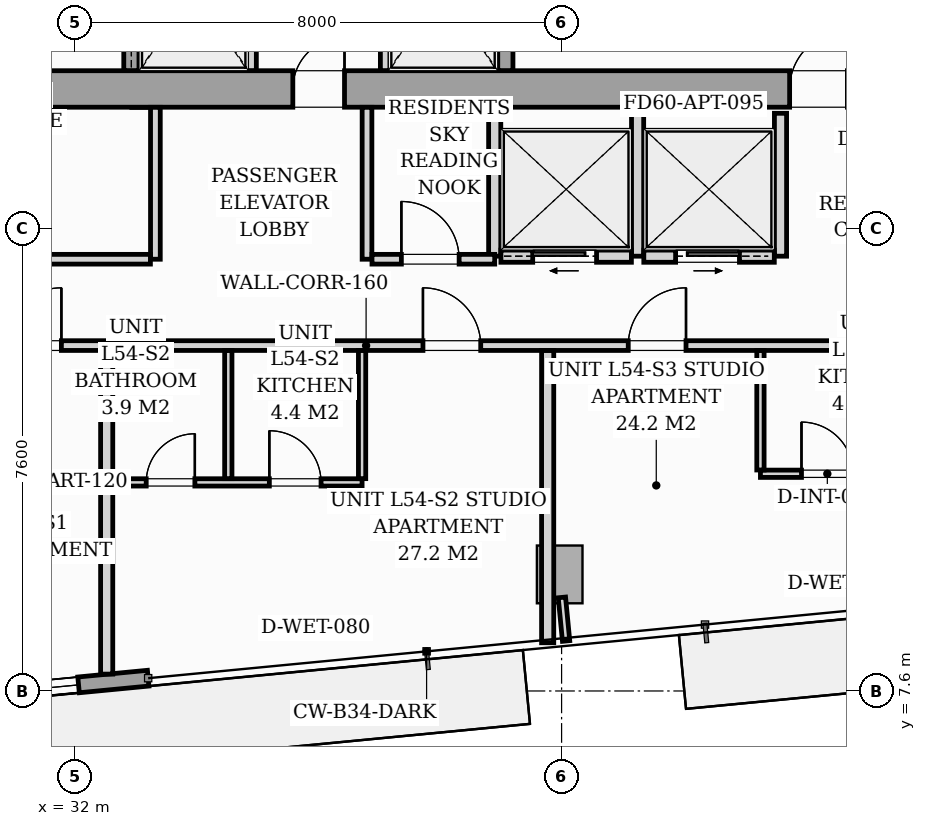
"""IFC4 building model, lengths in metres.
Left out: names, types, materials, properties, quantities, classifications, styles, units other than length and angle.
Written with IfcOpenShell. Run it as: python <this file> out.ifc"""

import sys

from ifc_helpers import new_model, si_unit, direction, frame, frame_2d, origin, origin_2d, place, context, subcontext, project, spatial, rectangle, i_section, extrude, source, transform, mapped, element, fill, save


model = new_model("IFC4")
c1 = context("Model", 3, precision=1e-05, world=origin(), true_north=direction((0.0, 1.0)))
c2 = subcontext(c1, "Body", "Model", "MODEL_VIEW")
j1 = project(units=[si_unit("LENGTHUNIT", "METRE"), si_unit("PLANEANGLEUNIT", "RADIAN")], contexts=[c1])
p1 = place(None, origin())
s1 = spatial("IfcSite", under=j1, at=p1, CompositionType="ELEMENT")
p2 = place(p1, origin())
s2 = spatial("IfcBuilding", under=s1, at=p2, CompositionType="ELEMENT")
p3 = place(p2, frame((0.0, 0.0, 189.0)))
s3 = spatial("IfcBuildingStorey", under=s2, at=p3, CompositionType="ELEMENT", Elevation=189.0)
m1 = source(origin(), c2, "Body", "SweptSolid", [
    extrude(i_section(OverallWidth=0.416, OverallDepth=0.446, WebThickness=0.039, FlangeThickness=0.063, FilletRadius=0.018, at=origin_2d()), origin(), (0.0, 0.0, 1.0), 3.196),
])
for number, where, z_axis, x_axis in (
    (1, (33.12, 17.4, 0.002), (0.0, 0.0, 1.0), (1.0, 0.0, 0.0)),
    (2, (38.88, 17.4, 0.002), (0.0, 0.0, 1.0), (1.0, 0.0, 0.0)),
):
    element("IfcColumn", number, at=place(p3, frame(where, z_axis=z_axis, x_axis=x_axis)), inside=s3, PredefinedType="PILASTER", context=c2, shape_type="MappedRepresentation", body=[
        mapped(m1, transform((0.0, 0.0, 0.0), scale=1.0)),
    ])
m2 = source(origin(), c2, "Body", "SweptSolid", [
    extrude(rectangle(XDim=0.75, YDim=0.95, at=origin_2d()), origin(), (0.0, 0.0, 1.0), 3.196),
])
p4 = place(p3, frame((39.969, 9.517, 0.002), z_axis=(0.0, 0.0, 1.0), x_axis=(0.995396198367, 0.09584575252, 0.0)))
e3 = element("IfcColumn", 3, at=p4, inside=s3, PredefinedType="COLUMN", context=c2, shape_type="MappedRepresentation", body=[
    mapped(m2, transform((0.0, 0.0, 0.0), scale=1.0)),
])
p5 = place(p3, frame((33.201, 7.81, 0.0), z_axis=(0.0, 0.0, 1.0), x_axis=(-0.995397074604, -0.095836652014, 0.0)))
e4 = element("IfcWall", 4, at=p5, inside=s3, PredefinedType="STANDARD", context=c2, shape_type="SweptSolid", body=[
    extrude(rectangle(XDim=16.1, YDim=0.26, at=frame_2d((8.05, 0.0))), origin(), (0.0, 0.0, 1.0), 2.94),
])
p6 = place(p5, frame((7.49, 0.0, 0.0)))
e5 = element("IfcOpeningElement", 5, at=p6, cuts=e4, PredefinedType="OPENING", context=c2, shape_type="SweptSolid", body=[
    extrude(rectangle(XDim=1.8, YDim=2.06, at=frame_2d((0.9, 1.03))), frame((0.0, 0.14, 0.0), z_axis=(0.0, -1.0, 0.0), x_axis=(1.0, 0.0, 0.0)), (0.0, 0.0, 1.0), 0.28),
])
p7 = place(p5, frame((1.15, 0.0, 0.65)))
e6 = element("IfcOpeningElement", 6, at=p7, cuts=e4, PredefinedType="OPENING", context=c2, shape_type="SweptSolid", body=[
    extrude(rectangle(XDim=1.6, YDim=1.5, at=frame_2d((0.8, 0.75))), frame((0.0, 0.14, 0.0), z_axis=(0.0, -1.0, 0.0), x_axis=(1.0, 0.0, 0.0)), (0.0, 0.0, 1.0), 0.28),
])
p8 = place(p3, frame((26.2, 17.5, 0.0), z_axis=(0.0, 0.0, 1.0), x_axis=(1.0, 0.0, 0.0)))
e7 = element("IfcWall", 7, at=p8, inside=s3, PredefinedType="SHEAR", context=c2, shape_type="SweptSolid", body=[
    extrude(rectangle(XDim=19.6, YDim=0.6, at=frame_2d((9.8, 0.0))), origin(), (0.0, 0.0, 1.0), 3.2),
])
p9 = place(p8, frame((0.95, 0.0, 0.0)))
e8 = element("IfcOpeningElement", 8, at=p9, cuts=e7, PredefinedType="OPENING", context=c2, shape_type="SweptSolid", body=[
    extrude(rectangle(XDim=0.95, YDim=2.06, at=frame_2d((0.475, 1.03))), frame((0.0, 0.31, 0.0), z_axis=(0.0, -1.0, 0.0), x_axis=(1.0, 0.0, 0.0)), (0.0, 0.0, 1.0), 0.62),
])
p10 = place(p8, frame((9.38, 0.0, 0.0)))
e9 = element("IfcOpeningElement", 9, at=p10, cuts=e7, PredefinedType="OPENING", context=c2, shape_type="SweptSolid", body=[
    extrude(rectangle(XDim=0.85, YDim=2.0, at=frame_2d((0.425, 1.0))), frame((0.0, 0.31, 0.0), z_axis=(0.0, -1.0, 0.0), x_axis=(1.0, 0.0, 0.0)), (0.0, 0.0, 1.0), 0.62),
])
p11 = place(p8, frame((17.55, 0.0, 0.0)))
e10 = element("IfcOpeningElement", 10, at=p11, cuts=e7, PredefinedType="OPENING", context=c2, shape_type="SweptSolid", body=[
    extrude(rectangle(XDim=0.95, YDim=2.06, at=frame_2d((0.475, 1.03))), frame((0.0, 0.31, 0.0), z_axis=(0.0, -1.0, 0.0), x_axis=(1.0, 0.0, 0.0)), (0.0, 0.0, 1.0), 0.62),
])
p12 = place(p3, frame((32.925, 17.802, 0.0), z_axis=(0.0, 0.0, 1.0), x_axis=(0.0, 1.0, 0.0)))
e11 = element("IfcWall", 11, at=p12, inside=s3, PredefinedType="SOLIDWALL", context=c2, shape_type="SweptSolid", body=[
    extrude(rectangle(XDim=2.646, YDim=0.25, at=frame_2d((1.323, 0.0))), origin(), (0.0, 0.0, 1.0), 3.2),
])
p13 = place(p12, frame((0.548, 0.0, 0.0)))
e12 = element("IfcOpeningElement", 12, at=p13, cuts=e11, PredefinedType="OPENING", context=c2, shape_type="SweptSolid", body=[
    extrude(rectangle(XDim=1.1, YDim=2.08, at=frame_2d((0.55, 1.04))), frame((0.0, 0.135, 0.0), z_axis=(0.0, -1.0, 0.0), x_axis=(1.0, 0.0, 0.0)), (0.0, 0.0, 1.0), 0.27),
])
for number, where, z_axis, x_axis in (
    (13, (34.9, 17.802, 0.0), (0.0, 0.0, 1.0), (0.0, 1.0, 0.0)),
    (14, (37.1, 17.802, 0.0), (0.0, 0.0, 1.0), (0.0, 1.0, 0.0)),
):
    element("IfcWall", number, at=place(p3, frame(where, z_axis=z_axis, x_axis=x_axis)), inside=s3, PredefinedType="PARTITIONING", context=c2, shape_type="SweptSolid", body=[
        extrude(rectangle(XDim=2.646, YDim=0.16, at=frame_2d((1.323, 0.0))), origin(), (0.0, 0.0, 1.0), 2.94),
    ])
p14 = place(p3, frame((39.075, 17.802, 0.0), z_axis=(0.0, 0.0, 1.0), x_axis=(0.0, 1.0, 0.0)))
e15 = element("IfcWall", 15, at=p14, inside=s3, PredefinedType="SOLIDWALL", context=c2, shape_type="SweptSolid", body=[
    extrude(rectangle(XDim=2.646, YDim=0.25, at=frame_2d((1.323, 0.0))), origin(), (0.0, 0.0, 1.0), 3.2),
])
p15 = place(p14, frame((0.548, 0.0, 0.0)))
e16 = element("IfcOpeningElement", 16, at=p15, cuts=e15, PredefinedType="OPENING", context=c2, shape_type="SweptSolid", body=[
    extrude(rectangle(XDim=1.1, YDim=2.08, at=frame_2d((0.55, 1.04))), frame((0.0, 0.135, 0.0), z_axis=(0.0, -1.0, 0.0), x_axis=(1.0, 0.0, 0.0)), (0.0, 0.0, 1.0), 0.27),
])
for number, where, z_axis, x_axis in (
    (17, (38.9, 14.75, 0.0), (0.0, 0.0, 1.0), (0.0, 1.0, 0.0)),
    (18, (41.25, 14.75, 0.0), (0.0, 0.0, 1.0), (0.0, 1.0, 0.0)),
    (19, (43.6, 14.75, 0.0), (0.0, 0.0, 1.0), (0.0, 1.0, 0.0)),
):
    element("IfcWall", number, at=place(p3, frame(where, z_axis=z_axis, x_axis=x_axis)), inside=s3, PredefinedType="PARTITIONING", context=c2, shape_type="SweptSolid", body=[
        extrude(rectangle(XDim=2.35, YDim=0.2, at=frame_2d((1.175, 0.0))), origin(), (0.0, 0.0, 1.0), 2.94),
    ])
p16 = place(p3, frame((39.002, 14.75, 0.0), z_axis=(0.0, 0.0, 1.0), x_axis=(1.0, 0.0, 0.0)))
e20 = element("IfcWall", 20, at=p16, inside=s3, PredefinedType="PARTITIONING", context=c2, shape_type="SweptSolid", body=[
    extrude(rectangle(XDim=2.146, YDim=0.2, at=frame_2d((1.073, 0.0))), origin(), (0.0, 0.0, 1.0), 2.94),
])
p17 = place(p16, frame((0.523, 0.0, 0.0)))
e21 = element("IfcOpeningElement", 21, at=p17, cuts=e20, PredefinedType="OPENING", context=c2, shape_type="SweptSolid", body=[
    extrude(rectangle(XDim=1.05, YDim=2.08, at=frame_2d((0.525, 1.04))), frame((0.0, 0.11, 0.0), z_axis=(0.0, -1.0, 0.0), x_axis=(1.0, 0.0, 0.0)), (0.0, 0.0, 1.0), 0.22),
])
p18 = place(p3, frame((41.352, 14.75, 0.0), z_axis=(0.0, 0.0, 1.0), x_axis=(1.0, 0.0, 0.0)))
e22 = element("IfcWall", 22, at=p18, inside=s3, PredefinedType="PARTITIONING", context=c2, shape_type="SweptSolid", body=[
    extrude(rectangle(XDim=2.146, YDim=0.2, at=frame_2d((1.073, 0.0))), origin(), (0.0, 0.0, 1.0), 2.94),
])
p19 = place(p18, frame((0.523, 0.0, 0.0)))
e23 = element("IfcOpeningElement", 23, at=p19, cuts=e22, PredefinedType="OPENING", context=c2, shape_type="SweptSolid", body=[
    extrude(rectangle(XDim=1.05, YDim=2.08, at=frame_2d((0.525, 1.04))), frame((0.0, 0.11, 0.0), z_axis=(0.0, -1.0, 0.0), x_axis=(1.0, 0.0, 0.0)), (0.0, 0.0, 1.0), 0.22),
])
p20 = place(p3, frame((26.12, 13.28, 0.0), z_axis=(0.0, 0.0, 1.0), x_axis=(1.0, 0.0, 0.0)))
e24 = element("IfcWall", 24, at=p20, inside=s3, PredefinedType="PARTITIONING", context=c2, shape_type="SweptSolid", body=[
    extrude(rectangle(XDim=21.33, YDim=0.16, at=frame_2d((10.665, 0.0))), origin(), (0.0, 0.0, 1.0), 2.94),
])
p21 = place(p20, frame((4.704, 0.0, 0.0)))
e25 = element("IfcOpeningElement", 25, at=p21, cuts=e24, PredefinedType="OPENING", context=c2, shape_type="SweptSolid", body=[
    extrude(rectangle(XDim=0.95, YDim=2.06, at=frame_2d((0.475, 1.03))), frame((0.0, 0.09, 0.0), z_axis=(0.0, -1.0, 0.0), x_axis=(1.0, 0.0, 0.0)), (0.0, 0.0, 1.0), 0.18),
])
p22 = place(p20, frame((11.6, 0.0, 0.0)))
e26 = element("IfcOpeningElement", 26, at=p22, cuts=e24, PredefinedType="OPENING", context=c2, shape_type="SweptSolid", body=[
    extrude(rectangle(XDim=0.95, YDim=2.06, at=frame_2d((0.475, 1.03))), frame((0.0, 0.09, 0.0), z_axis=(0.0, -1.0, 0.0), x_axis=(1.0, 0.0, 0.0)), (0.0, 0.0, 1.0), 0.18),
])
p23 = place(p20, frame((14.976, 0.0, 0.0)))
e27 = element("IfcOpeningElement", 27, at=p23, cuts=e24, PredefinedType="OPENING", context=c2, shape_type="SweptSolid", body=[
    extrude(rectangle(XDim=0.95, YDim=2.06, at=frame_2d((0.475, 1.03))), frame((0.0, 0.09, 0.0), z_axis=(0.0, -1.0, 0.0), x_axis=(1.0, 0.0, 0.0)), (0.0, 0.0, 1.0), 0.18),
])
p24 = place(p3, frame((32.519, 7.877, 0.0), z_axis=(0.0, 0.0, 1.0), x_axis=(0.0, 1.0, 0.0)))
e28 = element("IfcWall", 28, at=p24, inside=s3, PredefinedType="PARTITIONING", context=c2, shape_type="SweptSolid", body=[
    extrude(rectangle(XDim=5.321, YDim=0.2, at=frame_2d((2.66, 0.0))), origin(), (0.0, 0.0, 1.0), 2.94),
])
p25 = place(p3, frame((32.621, 11.03, 0.0), z_axis=(0.0, 0.0, 1.0), x_axis=(1.0, 0.0, 0.0)))
e29 = element("IfcWall", 29, at=p25, inside=s3, PredefinedType="PARTITIONING", context=c2, shape_type="SweptSolid", body=[
    extrude(rectangle(XDim=4.098, YDim=0.12, at=frame_2d((2.049, 0.0))), origin(), (0.0, 0.0, 1.0), 2.94),
])
p26 = place(p25, frame((0.548, 0.0, 0.0)))
e30 = element("IfcOpeningElement", 30, at=p26, cuts=e29, PredefinedType="OPENING", context=c2, shape_type="SweptSolid", body=[
    extrude(rectangle(XDim=0.8, YDim=2.02, at=frame_2d((0.4, 1.01))), frame((0.0, 0.07, 0.0), z_axis=(0.0, -1.0, 0.0), x_axis=(1.0, 0.0, 0.0)), (0.0, 0.0, 1.0), 0.14),
])
p27 = place(p25, frame((2.573, 0.0, 0.0)))
e31 = element("IfcOpeningElement", 31, at=p27, cuts=e29, PredefinedType="OPENING", context=c2, shape_type="SweptSolid", body=[
    extrude(rectangle(XDim=0.85, YDim=2.05, at=frame_2d((0.425, 1.025))), frame((0.0, 0.07, 0.0), z_axis=(0.0, -1.0, 0.0), x_axis=(1.0, 0.0, 0.0)), (0.0, 0.0, 1.0), 0.14),
])
for number, where, z_axis, x_axis in (
    (32, (36.719, 11.092, 0.0), (0.0, 0.0, 1.0), (0.0, 1.0, 0.0)),
    (33, (34.519, 11.092, 0.0), (0.0, 0.0, 1.0), (0.0, 1.0, 0.0)),
):
    element("IfcWall", number, at=place(p3, frame(where, z_axis=z_axis, x_axis=x_axis)), inside=s3, PredefinedType="PARTITIONING", context=c2, shape_type="SweptSolid", body=[
        extrude(rectangle(XDim=2.106, YDim=0.12, at=frame_2d((1.053, 0.0))), origin(), (0.0, 0.0, 1.0), 2.94),
    ])
p28 = place(p3, frame((39.771, 8.393, 0.0), z_axis=(0.0, 0.0, 1.0), x_axis=(0.0, 1.0, 0.0)))
e34 = element("IfcWall", 34, at=p28, inside=s3, PredefinedType="PARTITIONING", context=c2, shape_type="SweptSolid", body=[
    extrude(rectangle(XDim=4.805, YDim=0.2, at=frame_2d((2.403, 0.0))), origin(), (0.0, 0.0, 1.0), 2.94),
])
p29 = place(p3, frame((43.27, 11.172, 0.0), z_axis=(0.0, 0.0, 1.0), x_axis=(1.0, 0.0, 0.0)))
e35 = element("IfcWall", 35, at=p29, inside=s3, PredefinedType="PARTITIONING", context=c2, shape_type="SweptSolid", body=[
    extrude(rectangle(XDim=4.098, YDim=0.12, at=frame_2d((2.049, 0.0))), origin(), (0.0, 0.0, 1.0), 2.94),
])
p30 = place(p29, frame((0.675, 0.0, 0.0)))
e36 = element("IfcOpeningElement", 36, at=p30, cuts=e35, PredefinedType="OPENING", context=c2, shape_type="SweptSolid", body=[
    extrude(rectangle(XDim=0.85, YDim=2.05, at=frame_2d((0.425, 1.025))), frame((0.0, 0.07, 0.0), z_axis=(0.0, -1.0, 0.0), x_axis=(1.0, 0.0, 0.0)), (0.0, 0.0, 1.0), 0.14),
])
p31 = place(p29, frame((2.75, 0.0, 0.0)))
e37 = element("IfcOpeningElement", 37, at=p31, cuts=e35, PredefinedType="OPENING", context=c2, shape_type="SweptSolid", body=[
    extrude(rectangle(XDim=0.8, YDim=2.02, at=frame_2d((0.4, 1.01))), frame((0.0, 0.07, 0.0), z_axis=(0.0, -1.0, 0.0), x_axis=(1.0, 0.0, 0.0)), (0.0, 0.0, 1.0), 0.14),
])
p32 = place(p3, frame((43.27, 11.234, 0.0), z_axis=(0.0, 0.0, 1.0), x_axis=(0.0, 1.0, 0.0)))
e38 = element("IfcWall", 38, at=p32, inside=s3, PredefinedType="PARTITIONING", context=c2, shape_type="SweptSolid", body=[
    extrude(rectangle(XDim=1.964, YDim=0.12, at=frame_2d((0.982, 0.0))), origin(), (0.0, 0.0, 1.0), 2.94),
])
p33 = place(p3, frame((33.32, 14.7, 0.0), z_axis=(0.0, 0.0, 1.0), x_axis=(0.0, 1.0, 0.0)))
e39 = element("IfcWall", 39, at=p33, inside=s3, PredefinedType="PARTITIONING", context=c2, shape_type="SweptSolid", body=[
    extrude(rectangle(XDim=2.498, YDim=0.16, at=frame_2d((1.249, 0.0))), origin(), (0.0, 0.0, 1.0), 2.94),
])
p34 = place(p3, frame((28.442, 14.7, 0.0), z_axis=(0.0, 0.0, 1.0), x_axis=(1.0, 0.0, 0.0)))
e40 = element("IfcWall", 40, at=p34, inside=s3, PredefinedType="PARTITIONING", context=c2, shape_type="SweptSolid", body=[
    extrude(rectangle(XDim=4.796, YDim=0.16, at=frame_2d((2.398, 0.0))), origin(), (0.0, 0.0, 1.0), 2.94),
])
p35 = place(p34, frame((1.923, 0.0, 0.0)))
e41 = element("IfcOpeningElement", 41, at=p35, cuts=e40, PredefinedType="OPENING", context=c2, shape_type="SweptSolid", body=[
    extrude(rectangle(XDim=0.95, YDim=2.06, at=frame_2d((0.475, 1.03))), frame((0.0, 0.09, 0.0), z_axis=(0.0, -1.0, 0.0), x_axis=(1.0, 0.0, 0.0)), (0.0, 0.0, 1.0), 0.18),
])
p36 = place(p3, frame((36.8, 14.7, 0.0), z_axis=(0.0, 0.0, 1.0), x_axis=(0.0, 1.0, 0.0)))
e42 = element("IfcWall", 42, at=p36, inside=s3, PredefinedType="PARTITIONING", context=c2, shape_type="SweptSolid", body=[
    extrude(rectangle(XDim=2.498, YDim=0.16, at=frame_2d((1.249, 0.0))), origin(), (0.0, 0.0, 1.0), 2.94),
])
p37 = place(p3, frame((36.882, 14.7, 0.0), z_axis=(0.0, 0.0, 1.0), x_axis=(1.0, 0.0, 0.0)))
e43 = element("IfcWall", 43, at=p37, inside=s3, PredefinedType="PARTITIONING", context=c2, shape_type="SweptSolid", body=[
    extrude(rectangle(XDim=2.018, YDim=0.16, at=frame_2d((1.009, 0.0))), origin(), (0.0, 0.0, 1.0), 2.94),
])
p38 = place(p37, frame((0.483, 0.0, 0.0)))
e44 = element("IfcOpeningElement", 44, at=p38, cuts=e43, PredefinedType="OPENING", context=c2, shape_type="SweptSolid", body=[
    extrude(rectangle(XDim=0.95, YDim=2.06, at=frame_2d((0.475, 1.03))), frame((0.0, 0.09, 0.0), z_axis=(0.0, -1.0, 0.0), x_axis=(1.0, 0.0, 0.0)), (0.0, 0.0, 1.0), 0.18),
])
p39 = place(p3, frame((40.005, 9.139, 0.0), z_axis=(0.0, 0.0, 1.0), x_axis=(0.095977354523, -0.995383517755, 0.0)))
e45 = element("IfcWall", 45, at=p39, inside=s3, PredefinedType="PARTITIONING", context=c2, shape_type="SweptSolid", body=[
    extrude(rectangle(XDim=0.72, YDim=0.12, at=frame_2d((0.36, 0.0))), origin(), (0.0, 0.0, 1.0), 2.94),
])
m3 = source(origin(), c2, "Body", "SweptSolid", [
    extrude(rectangle(XDim=1.6, YDim=1.5, at=frame_2d((0.8, 0.75))), frame((0.0, 0.03, 0.0), z_axis=(0.0, -1.0, 0.0), x_axis=(1.0, 0.0, 0.0)), (0.0, 0.0, 1.0), 0.06),
])
p40 = place(p7, origin())
e46 = element("IfcWindow", 46, at=p40, inside=s3, PartitioningType="SINGLE_PANEL", PredefinedType="WINDOW", context=c2, shape_type="MappedRepresentation", body=[
    mapped(m3, transform((0.0, 0.0, 0.0), scale=1.0)),
])
fill(e6, e46)
m4 = source(origin(), c2, "Body", "SweptSolid", [
    extrude(rectangle(XDim=0.85, YDim=2.0, at=frame_2d((0.425, 1.0))), frame((0.0, 0.025, 0.0), z_axis=(0.0, -1.0, 0.0), x_axis=(1.0, 0.0, 0.0)), (0.0, 0.0, 1.0), 0.05),
])
p41 = place(p10, origin())
e47 = element("IfcDoor", 47, at=p41, inside=s3, OperationType="SINGLE_SWING_RIGHT", PredefinedType="DOOR", context=c2, shape_type="MappedRepresentation", body=[
    mapped(m4, transform((0.0, 0.0, 0.0), scale=1.0)),
])
fill(e9, e47)
m5 = source(origin(), c2, "Body", "SweptSolid", [
    extrude(rectangle(XDim=0.95, YDim=2.06, at=frame_2d((0.475, 1.03))), frame((0.0, 0.025, 0.0), z_axis=(0.0, -1.0, 0.0), x_axis=(1.0, 0.0, 0.0)), (0.0, 0.0, 1.0), 0.05),
])
p42 = place(p11, origin())
e48 = element("IfcDoor", 48, at=p42, inside=s3, OperationType="SINGLE_SWING_RIGHT", PredefinedType="DOOR", context=c2, shape_type="MappedRepresentation", body=[
    mapped(m5, transform((0.0, 0.0, 0.0), scale=1.0)),
])
fill(e10, e48)
m6 = source(origin(), c2, "Body", "SweptSolid", [
    extrude(rectangle(XDim=1.05, YDim=2.08, at=frame_2d((0.525, 1.04))), frame((0.0, 0.025, 0.0), z_axis=(0.0, -1.0, 0.0), x_axis=(1.0, 0.0, 0.0)), (0.0, 0.0, 1.0), 0.05),
])
p43 = place(p17, origin())
e49 = element("IfcDoor", 49, at=p43, inside=s3, OperationType="SLIDING_TO_LEFT", PredefinedType="DOOR", context=c2, shape_type="MappedRepresentation", body=[
    mapped(m6, transform((0.0, 0.0, 0.0), scale=1.0)),
])
fill(e21, e49)
p44 = place(p19, origin())
e50 = element("IfcDoor", 50, at=p44, inside=s3, OperationType="SLIDING_TO_RIGHT", PredefinedType="DOOR", context=c2, shape_type="MappedRepresentation", body=[
    mapped(m6, transform((0.0, 0.0, 0.0), scale=1.0)),
])
fill(e23, e50)
m7 = source(origin(), c2, "Body", "SweptSolid", [
    extrude(rectangle(XDim=0.95, YDim=2.06, at=frame_2d((0.475, 1.03))), frame((0.0, 0.025, 0.0), z_axis=(0.0, -1.0, 0.0), x_axis=(1.0, 0.0, 0.0)), (0.0, 0.0, 1.0), 0.05),
])
p45 = place(p21, origin())
e51 = element("IfcDoor", 51, at=p45, inside=s3, OperationType="SINGLE_SWING_RIGHT", PredefinedType="DOOR", context=c2, shape_type="MappedRepresentation", body=[
    mapped(m7, transform((0.0, 0.0, 0.0), scale=1.0)),
])
fill(e25, e51)
p46 = place(p22, origin())
e52 = element("IfcDoor", 52, at=p46, inside=s3, OperationType="SINGLE_SWING_LEFT", PredefinedType="DOOR", context=c2, shape_type="MappedRepresentation", body=[
    mapped(m7, transform((0.0, 0.0, 0.0), scale=1.0)),
])
fill(e26, e52)
m8 = source(origin(), c2, "Body", "SweptSolid", [
    extrude(rectangle(XDim=0.8, YDim=2.02, at=frame_2d((0.4, 1.01))), frame((0.0, 0.025, 0.0), z_axis=(0.0, -1.0, 0.0), x_axis=(1.0, 0.0, 0.0)), (0.0, 0.0, 1.0), 0.05),
])
p47 = place(p26, origin())
e53 = element("IfcDoor", 53, at=p47, inside=s3, OperationType="SINGLE_SWING_RIGHT", PredefinedType="DOOR", context=c2, shape_type="MappedRepresentation", body=[
    mapped(m8, transform((0.0, 0.0, 0.0), scale=1.0)),
])
fill(e30, e53)
m9 = source(origin(), c2, "Body", "SweptSolid", [
    extrude(rectangle(XDim=0.85, YDim=2.05, at=frame_2d((0.425, 1.025))), frame((0.0, 0.025, 0.0), z_axis=(0.0, -1.0, 0.0), x_axis=(1.0, 0.0, 0.0)), (0.0, 0.0, 1.0), 0.05),
])
p48 = place(p27, origin())
e54 = element("IfcDoor", 54, at=p48, inside=s3, OperationType="SINGLE_SWING_LEFT", PredefinedType="DOOR", context=c2, shape_type="MappedRepresentation", body=[
    mapped(m9, transform((0.0, 0.0, 0.0), scale=1.0)),
])
fill(e31, e54)
p49 = place(p23, origin())
e55 = element("IfcDoor", 55, at=p49, inside=s3, OperationType="SINGLE_SWING_RIGHT", PredefinedType="DOOR", context=c2, shape_type="MappedRepresentation", body=[
    mapped(m7, transform((0.0, 0.0, 0.0), scale=1.0)),
])
fill(e27, e55)
p50 = place(p30, origin())
e56 = element("IfcDoor", 56, at=p50, inside=s3, OperationType="SINGLE_SWING_LEFT", PredefinedType="DOOR", context=c2, shape_type="MappedRepresentation", body=[
    mapped(m9, transform((0.0, 0.0, 0.0), scale=1.0)),
])
fill(e36, e56)
p51 = place(p38, origin())
e57 = element("IfcDoor", 57, at=p51, inside=s3, OperationType="SINGLE_SWING_LEFT", PredefinedType="DOOR", context=c2, shape_type="MappedRepresentation", body=[
    mapped(m7, transform((0.0, 0.0, 0.0), scale=1.0)),
])
fill(e44, e57)
save(model, sys.argv[1])
